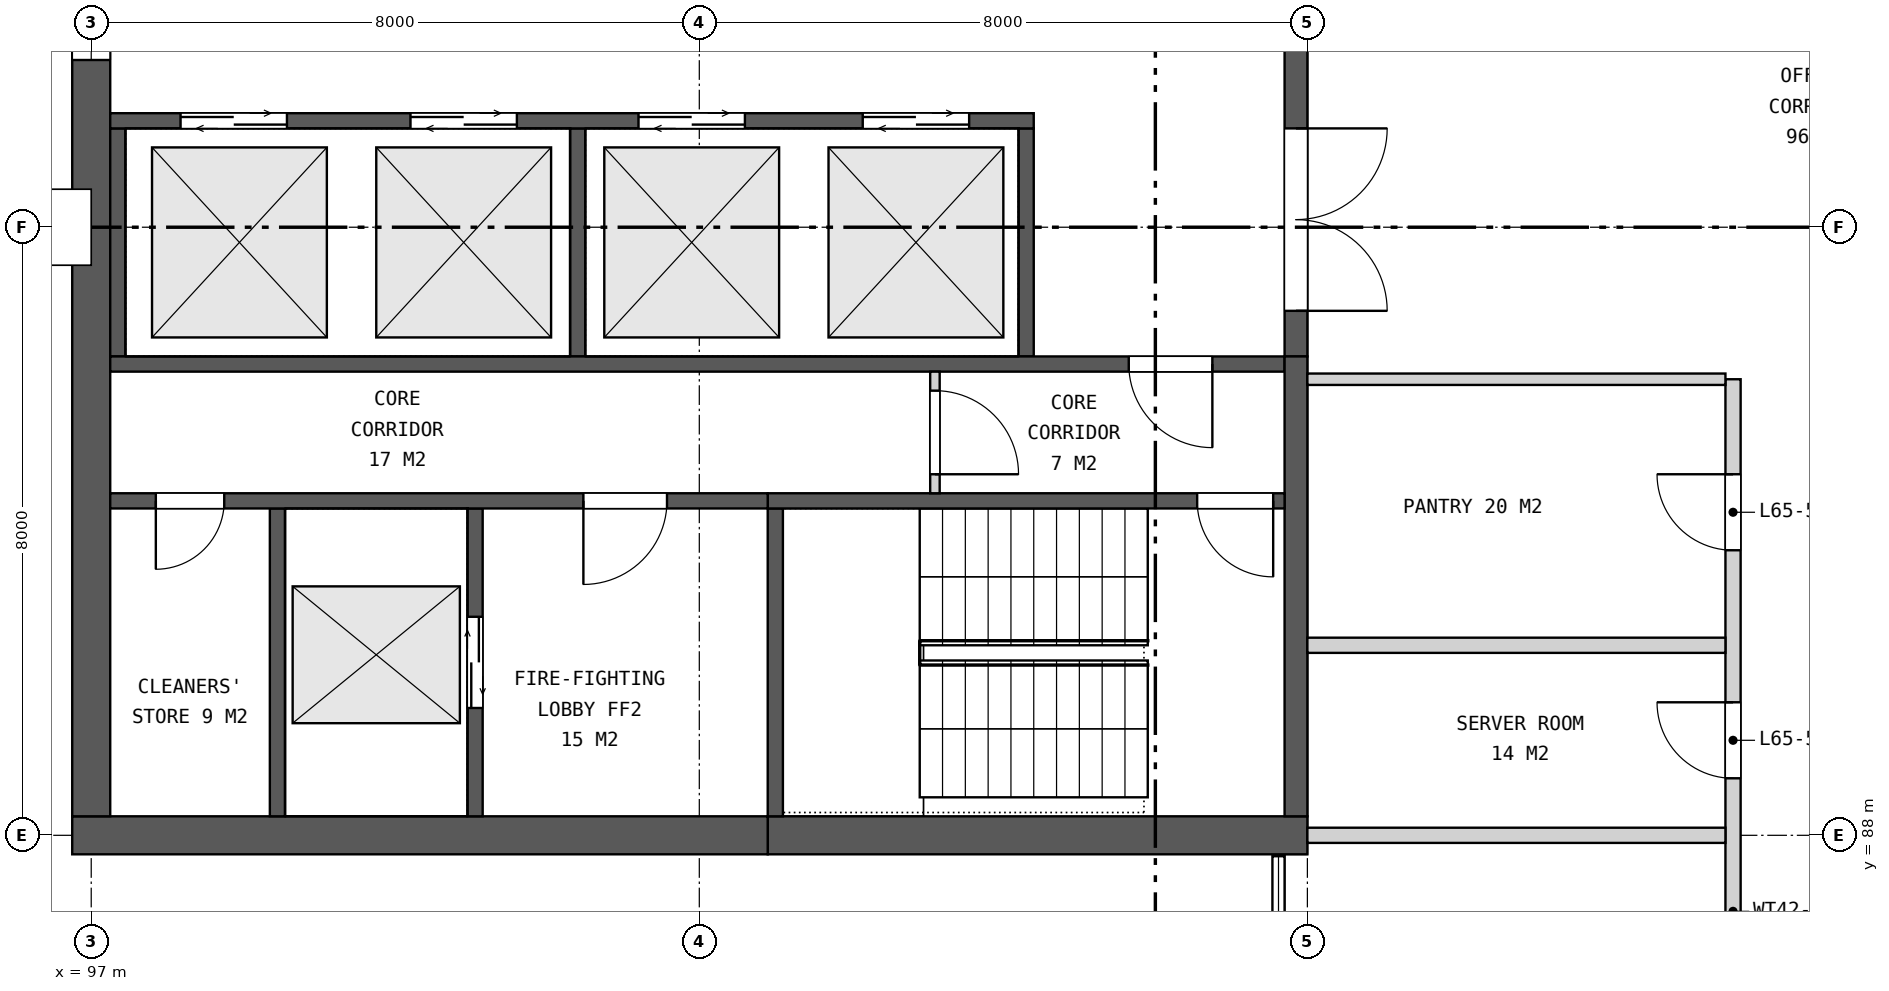
"""IFC4 building model, lengths in metres.
Left out: names, types, materials, properties, quantities, classifications, styles, units other than length and angle.
Written with IfcOpenShell. Run it as: python <this file> out.ifc"""

import sys

from ifc_helpers import new_model, si_unit, direction, frame, frame_2d, origin, place, context, subcontext, project, spatial, rectangle, extrude, element, fill, save


model = new_model("IFC4")
c1 = context("Model", 3, precision=1e-05, world=origin(), true_north=direction((0.0, 1.0)))
c2 = subcontext(c1, "Body", "Model", "MODEL_VIEW")
j1 = project(units=[si_unit("LENGTHUNIT", "METRE"), si_unit("PLANEANGLEUNIT", "RADIAN")], contexts=[c1])
p1 = place(None, origin())
s1 = spatial("IfcSite", under=j1, at=p1, CompositionType="ELEMENT")
p2 = place(p1, origin())
s2 = spatial("IfcBuilding", under=s1, at=p2, CompositionType="ELEMENT")
p3 = place(p2, frame((0.0, 0.0, 299.7)))
s3 = spatial("IfcBuildingStorey", under=s2, at=p3, CompositionType="ELEMENT", Elevation=299.7)
p4 = place(p3, frame((113.0, 88.0, 0.0), z_axis=(0.0, 0.0, 1.0), x_axis=(-1.0, 0.0, 0.0)))
e1 = element("IfcWall", 1, at=p4, inside=s3, PredefinedType="SHEAR", context=c2, shape_type="SweptSolid", body=[
    extrude(rectangle(XDim=7.1, YDim=0.5, at=frame_2d((3.55, 0.0))), origin(), (0.0, 0.0, 1.0), 4.2),
])
p5 = place(p3, frame((105.9, 88.0, 0.0), z_axis=(0.0, 0.0, 1.0), x_axis=(-1.0, 0.0, 0.0)))
e2 = element("IfcWall", 2, at=p5, inside=s3, PredefinedType="SHEAR", context=c2, shape_type="SweptSolid", body=[
    extrude(rectangle(XDim=9.15, YDim=0.5, at=frame_2d((4.575, 0.0))), origin(), (0.0, 0.0, 1.0), 4.2),
])
p6 = place(p3, frame((97.0, 111.75, 0.0), z_axis=(0.0, 0.0, 1.0), x_axis=(0.0, -1.0, 0.0)))
e3 = element("IfcWall", 3, at=p6, inside=s3, PredefinedType="SHEAR", context=c2, shape_type="SweptSolid", body=[
    extrude(rectangle(XDim=23.5, YDim=0.5, at=frame_2d((11.75, 0.0))), origin(), (0.0, 0.0, 1.0), 4.2),
])
p7 = place(p6, frame((9.95, 0.0, 0.15)))
e4 = element("IfcOpeningElement", 4, at=p7, cuts=e3, PredefinedType="OPENING", context=c2, shape_type="SweptSolid", body=[
    extrude(rectangle(XDim=3.6, YDim=3.0, at=frame_2d((1.8, 1.5))), frame((0.0, 0.26, 0.0), z_axis=(0.0, -1.0, 0.0), x_axis=(1.0, 0.0, 0.0)), (0.0, 0.0, 1.0), 0.52),
])
p8 = place(p3, frame((112.85, 105.7, 0.0), z_axis=(0.0, 0.0, 1.0), x_axis=(0.0, -1.0, 0.0)))
e5 = element("IfcWall", 5, at=p8, inside=s3, PredefinedType="SHEAR", context=c2, shape_type="SweptSolid", body=[
    extrude(rectangle(XDim=11.4, YDim=0.3, at=frame_2d((5.7, 0.0))), origin(), (0.0, 0.0, 1.0), 4.2),
])
p9 = place(p8, frame((0.6, 0.0, 0.0)))
e6 = element("IfcOpeningElement", 6, at=p9, cuts=e5, PredefinedType="OPENING", context=c2, shape_type="SweptSolid", body=[
    extrude(rectangle(XDim=2.4, YDim=2.4, at=frame_2d((1.2, 1.2))), frame((0.0, 0.16, 0.0), z_axis=(0.0, -1.0, 0.0), x_axis=(1.0, 0.0, 0.0)), (0.0, 0.0, 1.0), 0.32),
])
p10 = place(p8, frame((4.5, 0.0, 0.0)))
e7 = element("IfcOpeningElement", 7, at=p10, cuts=e5, PredefinedType="OPENING", context=c2, shape_type="SweptSolid", body=[
    extrude(rectangle(XDim=2.4, YDim=2.4, at=frame_2d((1.2, 1.2))), frame((0.0, 0.16, 0.0), z_axis=(0.0, -1.0, 0.0), x_axis=(1.0, 0.0, 0.0)), (0.0, 0.0, 1.0), 0.32),
])
p11 = place(p8, frame((8.4, 0.0, 0.0)))
e8 = element("IfcOpeningElement", 8, at=p11, cuts=e5, PredefinedType="OPENING", context=c2, shape_type="SweptSolid", body=[
    extrude(rectangle(XDim=2.4, YDim=2.4, at=frame_2d((1.2, 1.2))), frame((0.0, 0.16, 0.0), z_axis=(0.0, -1.0, 0.0), x_axis=(1.0, 0.0, 0.0)), (0.0, 0.0, 1.0), 0.32),
])
for number, where, z_axis, x_axis in (
    (9, (109.3, 97.3, 0.0), (0.0, 0.0, 1.0), (0.0, -1.0, 0.0)),
    (10, (103.4, 97.3, 0.0), (0.0, 0.0, 1.0), (0.0, -1.0, 0.0)),
    (11, (97.35, 97.3, 0.0), (0.0, 0.0, 1.0), (0.0, -1.0, 0.0)),
):
    element("IfcWall", number, at=place(p3, frame(where, z_axis=z_axis, x_axis=x_axis)), inside=s3, PredefinedType="SHEAR", context=c2, shape_type="SweptSolid", body=[
        extrude(rectangle(XDim=3.0, YDim=0.2, at=frame_2d((1.5, 0.0))), origin(), (0.0, 0.0, 1.0), 4.2),
    ])
p12 = place(p3, frame((109.4, 97.4, 0.0), z_axis=(0.0, 0.0, 1.0), x_axis=(-1.0, 0.0, 0.0)))
e12 = element("IfcWall", 12, at=p12, inside=s3, PredefinedType="SHEAR", context=c2, shape_type="SweptSolid", body=[
    extrude(rectangle(XDim=12.15, YDim=0.2, at=frame_2d((6.075, 0.0))), origin(), (0.0, 0.0, 1.0), 4.2),
])
p13 = place(p12, frame((0.85, 0.0, 0.0)))
e13 = element("IfcOpeningElement", 13, at=p13, cuts=e12, PredefinedType="OPENING", context=c2, shape_type="SweptSolid", body=[
    extrude(rectangle(XDim=1.4, YDim=2.1, at=frame_2d((0.7, 1.05))), frame((0.0, 0.11, 0.0), z_axis=(0.0, -1.0, 0.0), x_axis=(1.0, 0.0, 0.0)), (0.0, 0.0, 1.0), 0.22),
])
p14 = place(p12, frame((3.8, 0.0, 0.0)))
e14 = element("IfcOpeningElement", 14, at=p14, cuts=e12, PredefinedType="OPENING", context=c2, shape_type="SweptSolid", body=[
    extrude(rectangle(XDim=1.4, YDim=2.1, at=frame_2d((0.7, 1.05))), frame((0.0, 0.11, 0.0), z_axis=(0.0, -1.0, 0.0), x_axis=(1.0, 0.0, 0.0)), (0.0, 0.0, 1.0), 0.22),
])
p15 = place(p12, frame((6.8, 0.0, 0.0)))
e15 = element("IfcOpeningElement", 15, at=p15, cuts=e12, PredefinedType="OPENING", context=c2, shape_type="SweptSolid", body=[
    extrude(rectangle(XDim=1.4, YDim=2.1, at=frame_2d((0.7, 1.05))), frame((0.0, 0.11, 0.0), z_axis=(0.0, -1.0, 0.0), x_axis=(1.0, 0.0, 0.0)), (0.0, 0.0, 1.0), 0.22),
])
p16 = place(p12, frame((9.825, 0.0, 0.0)))
e16 = element("IfcOpeningElement", 16, at=p16, cuts=e12, PredefinedType="OPENING", context=c2, shape_type="SweptSolid", body=[
    extrude(rectangle(XDim=1.4, YDim=2.1, at=frame_2d((0.7, 1.05))), frame((0.0, 0.11, 0.0), z_axis=(0.0, -1.0, 0.0), x_axis=(1.0, 0.0, 0.0)), (0.0, 0.0, 1.0), 0.22),
])
p17 = place(p3, frame((112.7, 94.2, 0.0), z_axis=(0.0, 0.0, 1.0), x_axis=(-1.0, 0.0, 0.0)))
e17 = element("IfcWall", 17, at=p17, inside=s3, PredefinedType="SHEAR", context=c2, shape_type="SweptSolid", body=[
    extrude(rectangle(XDim=15.45, YDim=0.2, at=frame_2d((7.725, 0.0))), origin(), (0.0, 0.0, 1.0), 4.2),
])
p18 = place(p17, frame((0.95, 0.0, 0.0)))
e18 = element("IfcOpeningElement", 18, at=p18, cuts=e17, PredefinedType="OPENING", context=c2, shape_type="SweptSolid", body=[
    extrude(rectangle(XDim=1.1, YDim=2.1, at=frame_2d((0.55, 1.05))), frame((0.0, 0.11, 0.0), z_axis=(0.0, -1.0, 0.0), x_axis=(1.0, 0.0, 0.0)), (0.0, 0.0, 1.0), 0.22),
])
p19 = place(p3, frame((112.85, 94.3, 0.0), z_axis=(0.0, 0.0, 1.0), x_axis=(0.0, -1.0, 0.0)))
e19 = element("IfcWall", 19, at=p19, inside=s3, PredefinedType="SHEAR", context=c2, shape_type="SweptSolid", body=[
    extrude(rectangle(XDim=6.05, YDim=0.3, at=frame_2d((3.025, 0.0))), origin(), (0.0, 0.0, 1.0), 4.2),
])
p20 = place(p3, frame((106.0, 92.3, 0.0), z_axis=(0.0, 0.0, 1.0), x_axis=(0.0, -1.0, 0.0)))
e20 = element("IfcWall", 20, at=p20, inside=s3, PredefinedType="SHEAR", context=c2, shape_type="SweptSolid", body=[
    extrude(rectangle(XDim=4.05, YDim=0.2, at=frame_2d((2.025, 0.0))), origin(), (0.0, 0.0, 1.0), 4.2),
])
p21 = place(p3, frame((102.05, 92.3, 0.0), z_axis=(0.0, 0.0, 1.0), x_axis=(0.0, -1.0, 0.0)))
e21 = element("IfcWall", 21, at=p21, inside=s3, PredefinedType="SHEAR", context=c2, shape_type="SweptSolid", body=[
    extrude(rectangle(XDim=4.05, YDim=0.2, at=frame_2d((2.025, 0.0))), origin(), (0.0, 0.0, 1.0), 4.2),
])
p22 = place(p21, frame((1.425, 0.0, 0.0)))
e22 = element("IfcOpeningElement", 22, at=p22, cuts=e21, PredefinedType="OPENING", context=c2, shape_type="SweptSolid", body=[
    extrude(rectangle(XDim=1.2, YDim=2.1, at=frame_2d((0.6, 1.05))), frame((0.0, 0.11, 0.0), z_axis=(0.0, -1.0, 0.0), x_axis=(1.0, 0.0, 0.0)), (0.0, 0.0, 1.0), 0.22),
])
p23 = place(p3, frame((99.45, 92.3, 0.0), z_axis=(0.0, 0.0, 1.0), x_axis=(0.0, -1.0, 0.0)))
e23 = element("IfcWall", 23, at=p23, inside=s3, PredefinedType="SHEAR", context=c2, shape_type="SweptSolid", body=[
    extrude(rectangle(XDim=4.05, YDim=0.2, at=frame_2d((2.025, 0.0))), origin(), (0.0, 0.0, 1.0), 4.2),
])
p24 = place(p3, frame((112.7, 92.4, 0.0), z_axis=(0.0, 0.0, 1.0), x_axis=(-1.0, 0.0, 0.0)))
e24 = element("IfcWall", 24, at=p24, inside=s3, PredefinedType="SHEAR", context=c2, shape_type="SweptSolid", body=[
    extrude(rectangle(XDim=6.8, YDim=0.2, at=frame_2d((3.4, 0.0))), origin(), (0.0, 0.0, 1.0), 4.2),
])
p25 = place(p24, frame((0.15, 0.0, 0.0)))
e25 = element("IfcOpeningElement", 25, at=p25, cuts=e24, PredefinedType="OPENING", context=c2, shape_type="SweptSolid", body=[
    extrude(rectangle(XDim=1.0, YDim=2.1, at=frame_2d((0.5, 1.05))), frame((0.0, 0.11, 0.0), z_axis=(0.0, -1.0, 0.0), x_axis=(1.0, 0.0, 0.0)), (0.0, 0.0, 1.0), 0.22),
])
p26 = place(p3, frame((105.9, 92.4, 0.0), z_axis=(0.0, 0.0, 1.0), x_axis=(-1.0, 0.0, 0.0)))
e26 = element("IfcWall", 26, at=p26, inside=s3, PredefinedType="SHEAR", context=c2, shape_type="SweptSolid", body=[
    extrude(rectangle(XDim=8.65, YDim=0.2, at=frame_2d((4.325, 0.0))), origin(), (0.0, 0.0, 1.0), 4.2),
])
p27 = place(p26, frame((1.325, 0.0, 0.0)))
e27 = element("IfcOpeningElement", 27, at=p27, cuts=e26, PredefinedType="OPENING", context=c2, shape_type="SweptSolid", body=[
    extrude(rectangle(XDim=1.1, YDim=2.1, at=frame_2d((0.55, 1.05))), frame((0.0, 0.11, 0.0), z_axis=(0.0, -1.0, 0.0), x_axis=(1.0, 0.0, 0.0)), (0.0, 0.0, 1.0), 0.22),
])
p28 = place(p26, frame((7.15, 0.0, 0.0)))
e28 = element("IfcOpeningElement", 28, at=p28, cuts=e26, PredefinedType="OPENING", context=c2, shape_type="SweptSolid", body=[
    extrude(rectangle(XDim=0.9, YDim=2.1, at=frame_2d((0.45, 1.05))), frame((0.0, 0.11, 0.0), z_axis=(0.0, -1.0, 0.0), x_axis=(1.0, 0.0, 0.0)), (0.0, 0.0, 1.0), 0.22),
])
p29 = place(p3, frame((108.1, 94.1, 0.0), z_axis=(0.0, 0.0, 1.0), x_axis=(0.0, -1.0, 0.0)))
e29 = element("IfcWall", 29, at=p29, inside=s3, PredefinedType="PARTITIONING", context=c2, shape_type="SweptSolid", body=[
    extrude(rectangle(XDim=1.6, YDim=0.125, at=frame_2d((0.8, 0.0))), origin(), (0.0, 0.0, 1.0), 4.2),
])
p30 = place(p29, frame((0.25, 0.0, 0.0)))
e30 = element("IfcOpeningElement", 30, at=p30, cuts=e29, PredefinedType="OPENING", context=c2, shape_type="SweptSolid", body=[
    extrude(rectangle(XDim=1.1, YDim=2.1, at=frame_2d((0.55, 1.05))), frame((0.0, 0.073, 0.0), z_axis=(0.0, -1.0, 0.0), x_axis=(1.0, 0.0, 0.0)), (0.0, 0.0, 1.0), 0.145),
])
p31 = place(p3, frame((118.6, 80.0, 0.0), z_axis=(0.0, 0.0, 1.0), x_axis=(0.0, 1.0, 0.0)))
e31 = element("IfcWall", 31, at=p31, inside=s3, PredefinedType="SOLIDWALL", context=c2, shape_type="SweptSolid", body=[
    extrude(rectangle(XDim=14.0, YDim=0.2, at=frame_2d((7.0, 0.0))), origin(), (0.0, 0.0, 1.0), 3.255),
])
p32 = place(p31, frame((11.75, 0.0, 0.0)))
e32 = element("IfcOpeningElement", 32, at=p32, cuts=e31, PredefinedType="OPENING", context=c2, shape_type="SweptSolid", body=[
    extrude(rectangle(XDim=1.0, YDim=2.1, at=frame_2d((0.5, 1.05))), frame((0.0, 0.11, 0.0), z_axis=(0.0, -1.0, 0.0), x_axis=(1.0, 0.0, 0.0)), (0.0, 0.0, 1.0), 0.22),
])
p33 = place(p31, frame((8.75, 0.0, 0.0)))
e33 = element("IfcOpeningElement", 33, at=p33, cuts=e31, PredefinedType="OPENING", context=c2, shape_type="SweptSolid", body=[
    extrude(rectangle(XDim=1.0, YDim=2.1, at=frame_2d((0.5, 1.05))), frame((0.0, 0.11, 0.0), z_axis=(0.0, -1.0, 0.0), x_axis=(1.0, 0.0, 0.0)), (0.0, 0.0, 1.0), 0.22),
])
p34 = place(p31, frame((3.45, 0.0, 0.0)))
e34 = element("IfcOpeningElement", 34, at=p34, cuts=e31, PredefinedType="OPENING", context=c2, shape_type="SweptSolid", body=[
    extrude(rectangle(XDim=1.0, YDim=2.1, at=frame_2d((0.5, 1.05))), frame((0.0, 0.11, 0.0), z_axis=(0.0, -1.0, 0.0), x_axis=(1.0, 0.0, 0.0)), (0.0, 0.0, 1.0), 0.22),
])
for number, where, z_axis, x_axis in (
    (35, (113.0, 88.0, 0.0), (0.0, 0.0, 1.0), (1.0, 0.0, 0.0)),
    (36, (113.0, 90.5, 0.0), (0.0, 0.0, 1.0), (1.0, 0.0, 0.0)),
):
    element("IfcWall", number, at=place(p3, frame(where, z_axis=z_axis, x_axis=x_axis)), inside=s3, PredefinedType="SOLIDWALL", context=c2, shape_type="SweptSolid", body=[
        extrude(rectangle(XDim=5.5, YDim=0.2, at=frame_2d((2.75, 0.0))), origin(), (0.0, 0.0, 1.0), 3.255),
    ])
p35 = place(p3, frame((113.0, 94.0, 0.0), z_axis=(0.0, 0.0, 1.0), x_axis=(1.0, 0.0, 0.0)))
e37 = element("IfcWall", 37, at=p35, inside=s3, PredefinedType="PARTITIONING", context=c2, shape_type="SweptSolid", body=[
    extrude(rectangle(XDim=5.5, YDim=0.15, at=frame_2d((2.75, 0.0))), origin(), (0.0, 0.0, 1.0), 3.255),
])
p36 = place(p7, origin())
e38 = element("IfcWindow", 38, at=p36, inside=s3, PartitioningType="SINGLE_PANEL", PredefinedType="WINDOW", context=c2, shape_type="SweptSolid", body=[
    extrude(rectangle(XDim=3.6, YDim=3.0, at=frame_2d((1.8, 1.5))), frame((0.0, 0.03, 0.0), z_axis=(0.0, -1.0, 0.0), x_axis=(1.0, 0.0, 0.0)), (0.0, 0.0, 1.0), 0.06),
])
fill(e4, e38)
p37 = place(p11, origin())
e39 = element("IfcDoor", 39, at=p37, inside=s3, OperationType="DOUBLE_DOOR_SINGLE_SWING", PredefinedType="DOOR", context=c2, shape_type="SweptSolid", body=[
    extrude(rectangle(XDim=2.4, YDim=2.4, at=frame_2d((1.2, 1.2))), frame((0.0, 0.025, 0.0), z_axis=(0.0, -1.0, 0.0), x_axis=(1.0, 0.0, 0.0)), (0.0, 0.0, 1.0), 0.05),
])
fill(e8, e39)
p38 = place(p13, origin())
e40 = element("IfcDoor", 40, at=p38, inside=s3, OperationType="DOUBLE_DOOR_SLIDING", PredefinedType="DOOR", context=c2, shape_type="SweptSolid", body=[
    extrude(rectangle(XDim=1.4, YDim=2.1, at=frame_2d((0.7, 1.05))), frame((0.0, 0.025, 0.0), z_axis=(0.0, -1.0, 0.0), x_axis=(1.0, 0.0, 0.0)), (0.0, 0.0, 1.0), 0.05),
])
fill(e13, e40)
p39 = place(p14, origin())
e41 = element("IfcDoor", 41, at=p39, inside=s3, OperationType="DOUBLE_DOOR_SLIDING", PredefinedType="DOOR", context=c2, shape_type="SweptSolid", body=[
    extrude(rectangle(XDim=1.4, YDim=2.1, at=frame_2d((0.7, 1.05))), frame((0.0, 0.025, 0.0), z_axis=(0.0, -1.0, 0.0), x_axis=(1.0, 0.0, 0.0)), (0.0, 0.0, 1.0), 0.05),
])
fill(e14, e41)
p40 = place(p15, origin())
e42 = element("IfcDoor", 42, at=p40, inside=s3, OperationType="DOUBLE_DOOR_SLIDING", PredefinedType="DOOR", context=c2, shape_type="SweptSolid", body=[
    extrude(rectangle(XDim=1.4, YDim=2.1, at=frame_2d((0.7, 1.05))), frame((0.0, 0.025, 0.0), z_axis=(0.0, -1.0, 0.0), x_axis=(1.0, 0.0, 0.0)), (0.0, 0.0, 1.0), 0.05),
])
fill(e15, e42)
p41 = place(p16, origin())
e43 = element("IfcDoor", 43, at=p41, inside=s3, OperationType="DOUBLE_DOOR_SLIDING", PredefinedType="DOOR", context=c2, shape_type="SweptSolid", body=[
    extrude(rectangle(XDim=1.4, YDim=2.1, at=frame_2d((0.7, 1.05))), frame((0.0, 0.025, 0.0), z_axis=(0.0, -1.0, 0.0), x_axis=(1.0, 0.0, 0.0)), (0.0, 0.0, 1.0), 0.05),
])
fill(e16, e43)
p42 = place(p18, origin())
e44 = element("IfcDoor", 44, at=p42, inside=s3, OperationType="SINGLE_SWING_LEFT", PredefinedType="DOOR", context=c2, shape_type="SweptSolid", body=[
    extrude(rectangle(XDim=1.1, YDim=2.1, at=frame_2d((0.55, 1.05))), frame((0.0, 0.025, 0.0), z_axis=(0.0, -1.0, 0.0), x_axis=(1.0, 0.0, 0.0)), (0.0, 0.0, 1.0), 0.05),
])
fill(e18, e44)
p43 = place(p22, origin())
e45 = element("IfcDoor", 45, at=p43, inside=s3, OperationType="DOUBLE_DOOR_SLIDING", PredefinedType="DOOR", context=c2, shape_type="SweptSolid", body=[
    extrude(rectangle(XDim=1.2, YDim=2.1, at=frame_2d((0.6, 1.05))), frame((0.0, 0.025, 0.0), z_axis=(0.0, -1.0, 0.0), x_axis=(1.0, 0.0, 0.0)), (0.0, 0.0, 1.0), 0.05),
])
fill(e22, e45)
p44 = place(p25, origin())
e46 = element("IfcDoor", 46, at=p44, inside=s3, OperationType="SINGLE_SWING_LEFT", PredefinedType="DOOR", context=c2, shape_type="SweptSolid", body=[
    extrude(rectangle(XDim=1.0, YDim=2.1, at=frame_2d((0.5, 1.05))), frame((0.0, 0.025, 0.0), z_axis=(0.0, -1.0, 0.0), x_axis=(1.0, 0.0, 0.0)), (0.0, 0.0, 1.0), 0.05),
])
fill(e25, e46)
p45 = place(p27, origin())
e47 = element("IfcDoor", 47, at=p45, inside=s3, OperationType="SINGLE_SWING_RIGHT", PredefinedType="DOOR", context=c2, shape_type="SweptSolid", body=[
    extrude(rectangle(XDim=1.1, YDim=2.1, at=frame_2d((0.55, 1.05))), frame((0.0, 0.025, 0.0), z_axis=(0.0, -1.0, 0.0), x_axis=(1.0, 0.0, 0.0)), (0.0, 0.0, 1.0), 0.05),
])
fill(e27, e47)
p46 = place(p28, origin())
e48 = element("IfcDoor", 48, at=p46, inside=s3, OperationType="SINGLE_SWING_RIGHT", PredefinedType="DOOR", context=c2, shape_type="SweptSolid", body=[
    extrude(rectangle(XDim=0.9, YDim=2.1, at=frame_2d((0.45, 1.05))), frame((0.0, 0.025, 0.0), z_axis=(0.0, -1.0, 0.0), x_axis=(1.0, 0.0, 0.0)), (0.0, 0.0, 1.0), 0.05),
])
fill(e28, e48)
p47 = place(p30, origin())
e49 = element("IfcDoor", 49, at=p47, inside=s3, OperationType="SINGLE_SWING_RIGHT", PredefinedType="DOOR", context=c2, shape_type="SweptSolid", body=[
    extrude(rectangle(XDim=1.1, YDim=2.1, at=frame_2d((0.55, 1.05))), frame((0.0, 0.025, 0.0), z_axis=(0.0, -1.0, 0.0), x_axis=(1.0, 0.0, 0.0)), (0.0, 0.0, 1.0), 0.05),
])
fill(e30, e49)
p48 = place(p32, origin())
e50 = element("IfcDoor", 50, at=p48, inside=s3, OperationType="SINGLE_SWING_RIGHT", PredefinedType="DOOR", context=c2, shape_type="SweptSolid", body=[
    extrude(rectangle(XDim=1.0, YDim=2.1, at=frame_2d((0.5, 1.05))), frame((0.0, 0.025, 0.0), z_axis=(0.0, -1.0, 0.0), x_axis=(1.0, 0.0, 0.0)), (0.0, 0.0, 1.0), 0.05),
])
fill(e32, e50)
p49 = place(p33, origin())
e51 = element("IfcDoor", 51, at=p49, inside=s3, OperationType="SINGLE_SWING_RIGHT", PredefinedType="DOOR", context=c2, shape_type="SweptSolid", body=[
    extrude(rectangle(XDim=1.0, YDim=2.1, at=frame_2d((0.5, 1.05))), frame((0.0, 0.025, 0.0), z_axis=(0.0, -1.0, 0.0), x_axis=(1.0, 0.0, 0.0)), (0.0, 0.0, 1.0), 0.05),
])
fill(e33, e51)
save(model, sys.argv[1])
